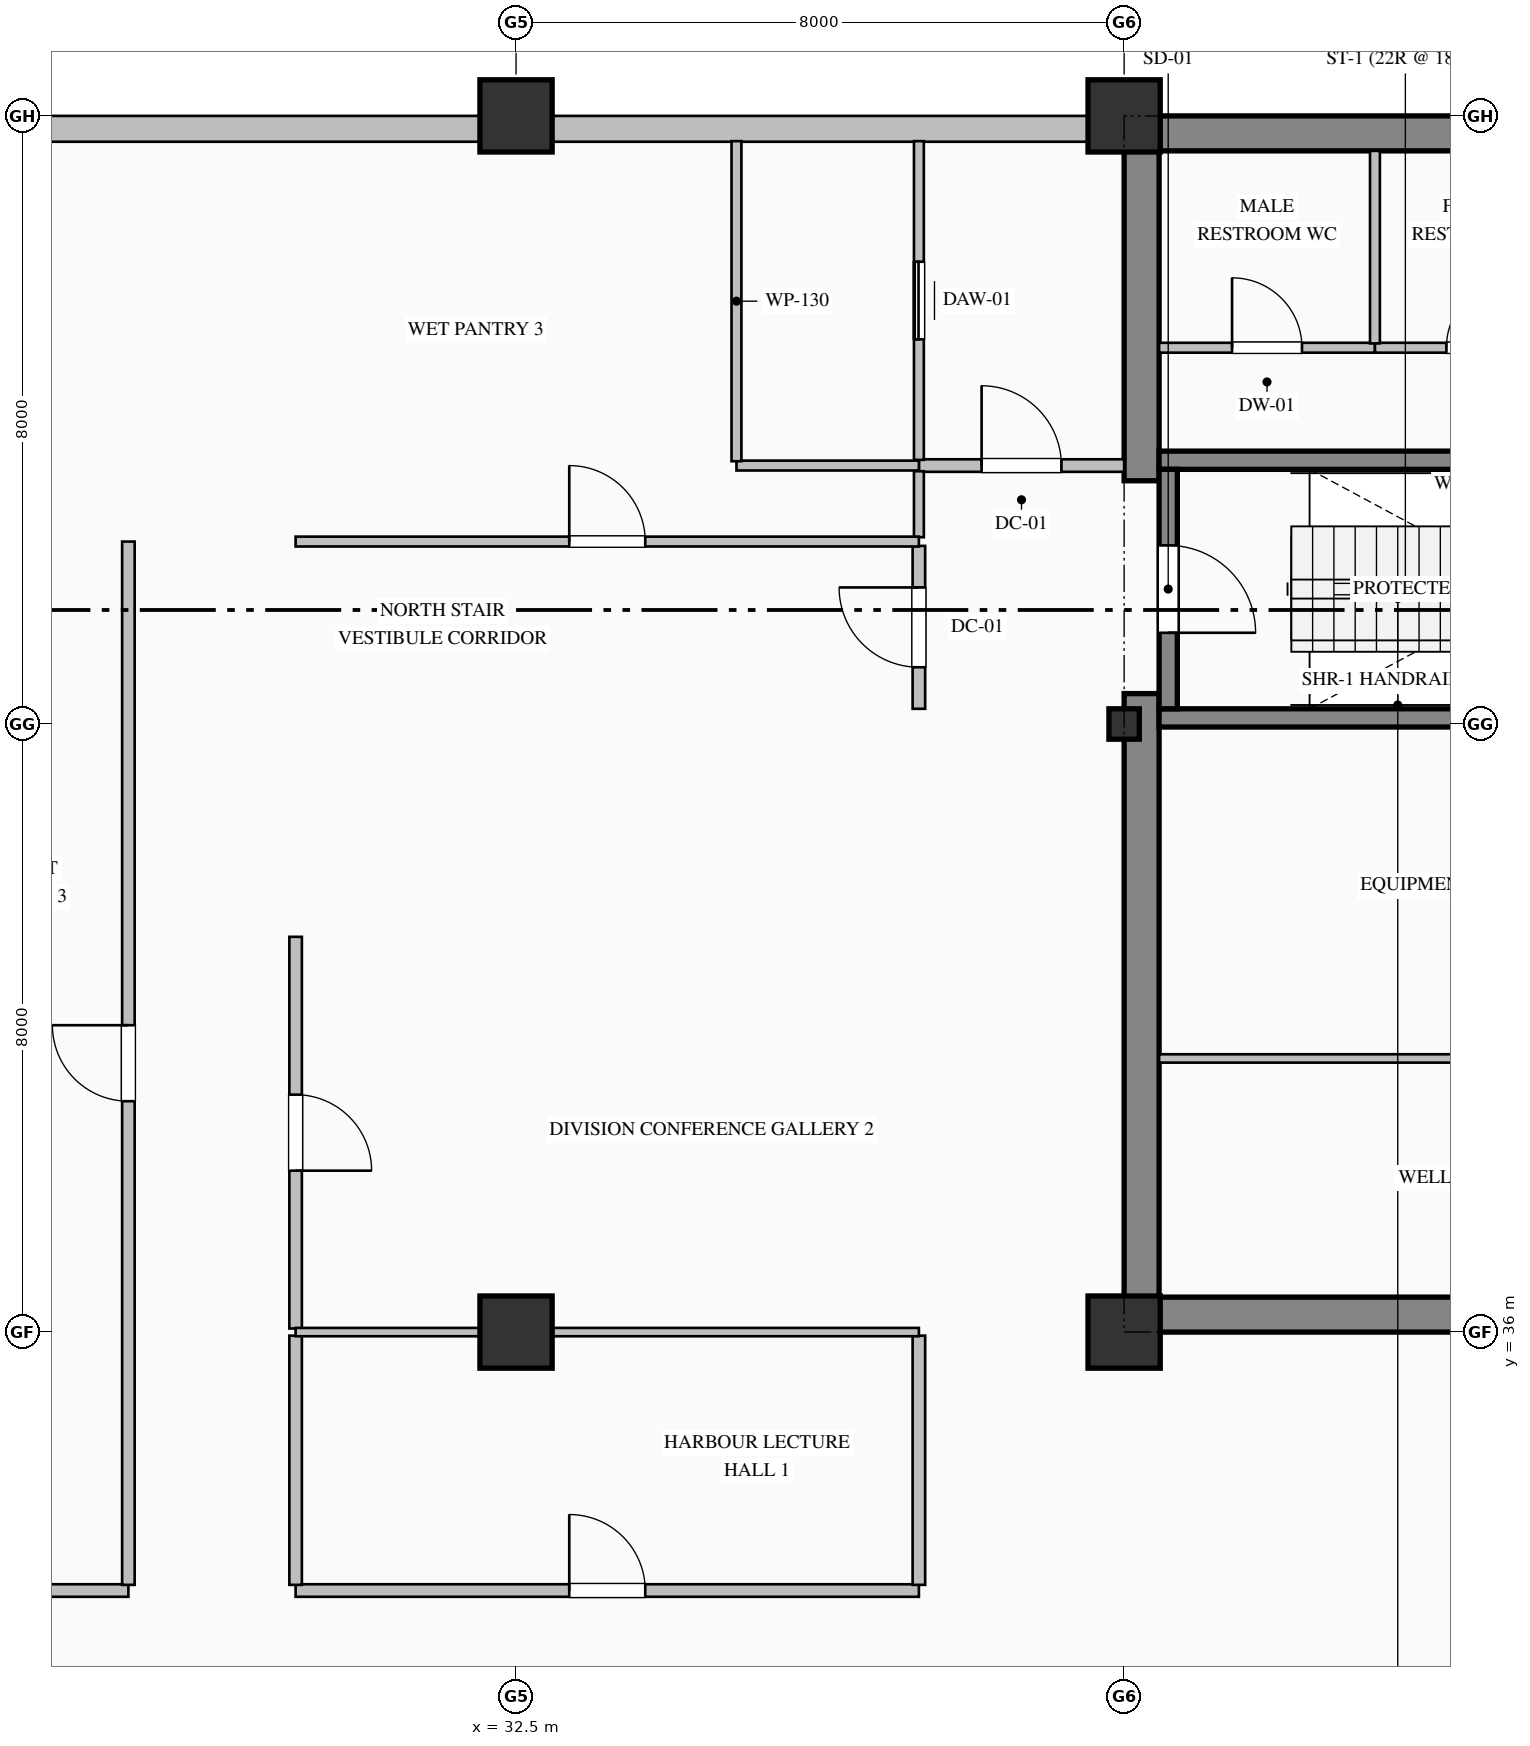
"""IFC4 building model, lengths in metres.
Left out: names, types, materials, properties, quantities, classifications, styles, units other than length and angle.
Written with IfcOpenShell. Run it as: python <this file> out.ifc"""

import sys

from ifc_helpers import new_model, si_unit, direction, frame, frame_2d, origin, origin_2d, place, context, subcontext, project, spatial, rectangle, hollow_rectangle, i_section, extrude, element, fill, save


model = new_model("IFC4")
c1 = context("Model", 3, precision=1e-05, world=origin(), true_north=direction((0.0, 1.0)))
c2 = subcontext(c1, "Body", "Model", "MODEL_VIEW")
j1 = project(units=[si_unit("LENGTHUNIT", "METRE"), si_unit("PLANEANGLEUNIT", "RADIAN")], contexts=[c1])
p1 = place(None, origin())
s1 = spatial("IfcSite", under=j1, at=p1, CompositionType="ELEMENT")
p2 = place(p1, origin())
s2 = spatial("IfcBuilding", under=s1, at=p2, CompositionType="ELEMENT")
p3 = place(p2, frame((0.0, 0.0, 221.8)))
s3 = spatial("IfcBuildingStorey", under=s2, at=p3, CompositionType="ELEMENT", Elevation=221.8)
p4 = place(p3, frame((40.5, 51.77, 0.0), z_axis=(0.0, 0.0, 1.0), x_axis=(1.0, 0.0, 0.0)))
e1 = element("IfcWall", 1, at=p4, inside=s3, PredefinedType="SHEAR", context=c2, shape_type="SweptSolid", body=[
    extrude(rectangle(XDim=23.5, YDim=0.46, at=frame_2d((11.75, 0.0))), origin(), (0.0, 0.0, 1.0), 3.775),
])
p5 = place(p3, frame((40.73, 36.46, 0.0), z_axis=(0.0, 0.0, 1.0), x_axis=(0.0, 1.0, 0.0)))
e2 = element("IfcWall", 2, at=p5, inside=s3, PredefinedType="SHEAR", context=c2, shape_type="SweptSolid", body=[
    extrude(rectangle(XDim=7.94, YDim=0.46, at=frame_2d((3.97, 0.0))), origin(), (0.0, 0.0, 1.0), 3.775),
])
p6 = place(p3, frame((40.73, 47.2, 0.0), z_axis=(0.0, 0.0, 1.0), x_axis=(0.0, 1.0, 0.0)))
e3 = element("IfcWall", 3, at=p6, inside=s3, PredefinedType="SHEAR", context=c2, shape_type="SweptSolid", body=[
    extrude(rectangle(XDim=4.34, YDim=0.46, at=frame_2d((2.17, 0.0))), origin(), (0.0, 0.0, 1.0), 3.775),
])
p7 = place(p3, frame((40.5, 36.23, 0.0), z_axis=(0.0, 0.0, 1.0), x_axis=(1.0, 0.0, 0.0)))
e4 = element("IfcWall", 4, at=p7, inside=s3, PredefinedType="SHEAR", context=c2, shape_type="SweptSolid", body=[
    extrude(rectangle(XDim=9.1, YDim=0.46, at=frame_2d((4.55, 0.0))), origin(), (0.0, 0.0, 1.0), 3.775),
])
for number, where, z_axis, x_axis in (
    (5, (32.5, 36.0, 0.0), (0.0, 0.0, 1.0), (1.0, 0.0, 0.0)),
    (6, (32.5, 52.0, 0.0), (0.0, 0.0, 1.0), (1.0, 0.0, 0.0)),
    (7, (40.5, 36.0, 0.0), (0.0, 0.0, 1.0), (1.0, 0.0, 0.0)),
):
    element("IfcColumn", number, at=place(p3, frame(where, z_axis=z_axis, x_axis=x_axis)), inside=s3, PredefinedType="COLUMN", context=c2, shape_type="SweptSolid", body=[
        extrude(hollow_rectangle(XDim=0.95, YDim=0.95, WallThickness=0.036, at=origin_2d()), origin(), (0.0, 0.0, 1.0), 4.0),
    ])
p8 = place(p3, frame((40.5, 44.0, 0.0), z_axis=(0.0, 0.0, 1.0), x_axis=(1.0, 0.0, 0.0)))
e8 = element("IfcColumn", 8, at=p8, inside=s3, PredefinedType="COLUMN", context=c2, shape_type="SweptSolid", body=[
    extrude(i_section(OverallWidth=0.4, OverallDepth=0.4, WebThickness=0.013, FlangeThickness=0.021, FilletRadius=0.022, at=origin_2d()), origin(), (0.0, 0.0, 1.0), 4.0),
])
p9 = place(p3, frame((40.5, 52.0, 0.0), z_axis=(0.0, 0.0, 1.0), x_axis=(1.0, 0.0, 0.0)))
e9 = element("IfcColumn", 9, at=p9, inside=s3, PredefinedType="COLUMN", context=c2, shape_type="SweptSolid", body=[
    extrude(hollow_rectangle(XDim=0.95, YDim=0.95, WallThickness=0.036, at=origin_2d()), origin(), (0.0, 0.0, 1.0), 4.0),
])
p10 = place(p3, frame((13.0, 51.83, 0.0), z_axis=(0.0, 0.0, 1.0), x_axis=(1.0, 0.0, 0.0)))
e10 = element("IfcWall", 10, at=p10, inside=s3, PredefinedType="SOLIDWALL", context=c2, shape_type="SweptSolid", body=[
    extrude(rectangle(XDim=27.52, YDim=0.34, at=frame_2d((13.76, 0.0))), origin(), (0.0, 0.0, 1.0), 3.325),
])
p11 = place(p10, frame((6.45, 0.0, 0.7)))
e11 = element("IfcOpeningElement", 11, at=p11, cuts=e10, PredefinedType="OPENING", context=c2, shape_type="SweptSolid", body=[
    extrude(rectangle(XDim=1.5, YDim=2.4, at=frame_2d((0.75, 1.2))), frame((0.0, 0.18, 0.0), z_axis=(0.0, -1.0, 0.0), x_axis=(1.0, 0.0, 0.0)), (0.0, 0.0, 1.0), 0.36),
])
for number, where, z_axis, x_axis in (
    (12, (40.96, 47.47, 0.0), (0.0, 0.0, 1.0), (1.0, 0.0, 0.0)),
    (13, (49.04, 44.08, 0.0), (0.0, 0.0, 1.0), (-1.0, 0.0, 0.0)),
):
    element("IfcWall", number, at=place(p3, frame(where, z_axis=z_axis, x_axis=x_axis)), inside=s3, PredefinedType="SOLIDWALL", context=c2, shape_type="SweptSolid", body=[
        extrude(rectangle(XDim=8.08, YDim=0.24, at=frame_2d((4.04, 0.0))), origin(), (0.0, 0.0, 1.0), 4.0),
    ])
p12 = place(p3, frame((41.08, 47.35, 0.0), z_axis=(0.0, 0.0, 1.0), x_axis=(0.0, -1.0, 0.0)))
e14 = element("IfcWall", 14, at=p12, inside=s3, PredefinedType="SOLIDWALL", context=c2, shape_type="SweptSolid", body=[
    extrude(rectangle(XDim=3.15, YDim=0.24, at=frame_2d((1.575, 0.0))), origin(), (0.0, 0.0, 1.0), 4.0),
])
p13 = place(p12, frame((1.0, 0.0, 0.0)))
e15 = element("IfcOpeningElement", 15, at=p13, cuts=e14, PredefinedType="OPENING", context=c2, shape_type="SweptSolid", body=[
    extrude(rectangle(XDim=1.15, YDim=2.2, at=frame_2d((0.575, 1.1))), frame((0.0, 0.13, 0.0), z_axis=(0.0, -1.0, 0.0), x_axis=(1.0, 0.0, 0.0)), (0.0, 0.0, 1.0), 0.26),
])
p14 = place(p3, frame((37.8, 47.4, 0.0), z_axis=(0.0, 0.0, 1.0), x_axis=(1.0, 0.0, 0.0)))
e16 = element("IfcWall", 16, at=p14, inside=s3, PredefinedType="PARTITIONING", context=c2, shape_type="SweptSolid", body=[
    extrude(rectangle(XDim=2.7, YDim=0.165, at=frame_2d((1.35, 0.0))), origin(), (0.0, 0.0, 1.0), 3.775),
])
p15 = place(p14, frame((0.825, 0.0, 0.0)))
e17 = element("IfcOpeningElement", 17, at=p15, cuts=e16, PredefinedType="OPENING", context=c2, shape_type="SweptSolid", body=[
    extrude(rectangle(XDim=1.05, YDim=2.15, at=frame_2d((0.525, 1.075))), frame((0.0, 0.093, 0.0), z_axis=(0.0, -1.0, 0.0), x_axis=(1.0, 0.0, 0.0)), (0.0, 0.0, 1.0), 0.185),
])
p16 = place(p3, frame((37.8, 44.2, 0.0), z_axis=(0.0, 0.0, 1.0), x_axis=(0.0, 1.0, 0.0)))
e18 = element("IfcWall", 18, at=p16, inside=s3, PredefinedType="PARTITIONING", context=c2, shape_type="SweptSolid", body=[
    extrude(rectangle(XDim=2.143, YDim=0.165, at=frame_2d((1.072, 0.0))), origin(), (0.0, 0.0, 1.0), 3.775),
])
p17 = place(p16, frame((0.546, 0.0, 0.0)))
e19 = element("IfcOpeningElement", 19, at=p17, cuts=e18, PredefinedType="OPENING", context=c2, shape_type="SweptSolid", body=[
    extrude(rectangle(XDim=1.05, YDim=2.15, at=frame_2d((0.525, 1.075))), frame((0.0, 0.093, 0.0), z_axis=(0.0, -1.0, 0.0), x_axis=(1.0, 0.0, 0.0)), (0.0, 0.0, 1.0), 0.185),
])
p18 = place(p3, frame((37.8, 46.457, 0.0), z_axis=(0.0, 0.0, 1.0), x_axis=(0.0, 1.0, 0.0)))
e20 = element("IfcWall", 20, at=p18, inside=s3, PredefinedType="PARTITIONING", context=c2, shape_type="SweptSolid", body=[
    extrude(rectangle(XDim=0.868, YDim=0.13, at=frame_2d((0.434, 0.0))), origin(), (0.0, 0.0, 1.0), 3.775),
])
p19 = place(p3, frame((37.8, 47.475, 0.0), z_axis=(0.0, 0.0, 1.0), x_axis=(0.0, 1.0, 0.0)))
e21 = element("IfcWall", 21, at=p19, inside=s3, PredefinedType="PARTITIONING", context=c2, shape_type="SweptSolid", body=[
    extrude(rectangle(XDim=4.193, YDim=0.13, at=frame_2d((2.097, 0.0))), origin(), (0.0, 0.0, 1.0), 3.775),
])
p20 = place(p19, frame((1.587, 0.0, 0.0)))
e22 = element("IfcOpeningElement", 22, at=p20, cuts=e21, PredefinedType="OPENING", context=c2, shape_type="SweptSolid", body=[
    extrude(rectangle(XDim=1.02, YDim=2.15, at=frame_2d((0.51, 1.075))), frame((0.0, 0.075, 0.0), z_axis=(0.0, -1.0, 0.0), x_axis=(1.0, 0.0, 0.0)), (0.0, 0.0, 1.0), 0.15),
])
p21 = place(p3, frame((37.8, 47.4, 0.0), z_axis=(0.0, 0.0, 1.0), x_axis=(-1.0, 0.0, 0.0)))
e23 = element("IfcWall", 23, at=p21, inside=s3, PredefinedType="PARTITIONING", context=c2, shape_type="SweptSolid", body=[
    extrude(rectangle(XDim=2.4, YDim=0.13, at=frame_2d((1.2, 0.0))), origin(), (0.0, 0.0, 1.0), 3.775),
])
p22 = place(p3, frame((35.4, 47.457, 0.0), z_axis=(0.0, 0.0, 1.0), x_axis=(0.0, 1.0, 0.0)))
e24 = element("IfcWall", 24, at=p22, inside=s3, PredefinedType="PARTITIONING", context=c2, shape_type="SweptSolid", body=[
    extrude(rectangle(XDim=4.211, YDim=0.13, at=frame_2d((2.105, 0.0))), origin(), (0.0, 0.0, 1.0), 3.775),
])
p23 = place(p3, frame((40.96, 48.95, 0.0), z_axis=(0.0, 0.0, 1.0), x_axis=(1.0, 0.0, 0.0)))
e25 = element("IfcWall", 25, at=p23, inside=s3, PredefinedType="PARTITIONING", context=c2, shape_type="SweptSolid", body=[
    extrude(rectangle(XDim=2.84, YDim=0.13, at=frame_2d((1.42, 0.0))), origin(), (0.0, 0.0, 1.0), 3.775),
])
p24 = place(p23, frame((0.96, 0.0, 0.0)))
e26 = element("IfcOpeningElement", 26, at=p24, cuts=e25, PredefinedType="OPENING", context=c2, shape_type="SweptSolid", body=[
    extrude(rectangle(XDim=0.92, YDim=2.15, at=frame_2d((0.46, 1.075))), frame((0.0, 0.075, 0.0), z_axis=(0.0, -1.0, 0.0), x_axis=(1.0, 0.0, 0.0)), (0.0, 0.0, 1.0), 0.15),
])
p25 = place(p3, frame((43.8, 48.95, 0.0), z_axis=(0.0, 0.0, 1.0), x_axis=(1.0, 0.0, 0.0)))
e27 = element("IfcWall", 27, at=p25, inside=s3, PredefinedType="PARTITIONING", context=c2, shape_type="SweptSolid", body=[
    extrude(rectangle(XDim=2.8, YDim=0.13, at=frame_2d((1.4, 0.0))), origin(), (0.0, 0.0, 1.0), 3.775),
])
p26 = place(p25, frame((0.94, 0.0, 0.0)))
e28 = element("IfcOpeningElement", 28, at=p26, cuts=e27, PredefinedType="OPENING", context=c2, shape_type="SweptSolid", body=[
    extrude(rectangle(XDim=0.92, YDim=2.15, at=frame_2d((0.46, 1.075))), frame((0.0, 0.075, 0.0), z_axis=(0.0, -1.0, 0.0), x_axis=(1.0, 0.0, 0.0)), (0.0, 0.0, 1.0), 0.15),
])
p27 = place(p3, frame((40.96, 39.6, 0.0), z_axis=(0.0, 0.0, 1.0), x_axis=(1.0, 0.0, 0.0)))
e29 = element("IfcWall", 29, at=p27, inside=s3, PredefinedType="MOVABLE", context=c2, shape_type="SweptSolid", body=[
    extrude(rectangle(XDim=8.44, YDim=0.11, at=frame_2d((4.22, 0.0))), origin(), (0.0, 0.0, 1.0), 3.775),
])
p28 = place(p3, frame((43.8, 51.54, 0.0), z_axis=(0.0, 0.0, 1.0), x_axis=(0.0, -1.0, 0.0)))
e30 = element("IfcWall", 30, at=p28, inside=s3, PredefinedType="PARTITIONING", context=c2, shape_type="SweptSolid", body=[
    extrude(rectangle(XDim=2.533, YDim=0.13, at=frame_2d((1.267, 0.0))), origin(), (0.0, 0.0, 1.0), 3.775),
])
p29 = place(p3, frame((24.5, 32.6, 0.0), z_axis=(0.0, 0.0, 1.0), x_axis=(1.0, 0.0, 0.0)))
e31 = element("IfcWall", 31, at=p29, inside=s3, PredefinedType="PARTITIONING", context=c2, shape_type="SweptSolid", body=[
    extrude(rectangle(XDim=2.9, YDim=0.165, at=frame_2d((1.45, 0.0))), origin(), (0.0, 0.0, 1.0), 3.775),
])
p30 = place(p3, frame((29.6, 32.6, 0.0), z_axis=(0.0, 0.0, 1.0), x_axis=(1.0, 0.0, 0.0)))
e32 = element("IfcWall", 32, at=p30, inside=s3, PredefinedType="PARTITIONING", context=c2, shape_type="SweptSolid", body=[
    extrude(rectangle(XDim=8.2, YDim=0.165, at=frame_2d((4.1, 0.0))), origin(), (0.0, 0.0, 1.0), 3.775),
])
p31 = place(p30, frame((3.6, 0.0, 0.0)))
e33 = element("IfcOpeningElement", 33, at=p31, cuts=e32, PredefinedType="OPENING", context=c2, shape_type="SweptSolid", body=[
    extrude(rectangle(XDim=1.0, YDim=2.15, at=frame_2d((0.5, 1.075))), frame((0.0, 0.093, 0.0), z_axis=(0.0, -1.0, 0.0), x_axis=(1.0, 0.0, 0.0)), (0.0, 0.0, 1.0), 0.185),
])
p32 = place(p3, frame((27.4, 32.675, 0.0), z_axis=(0.0, 0.0, 1.0), x_axis=(0.0, 1.0, 0.0)))
e34 = element("IfcWall", 34, at=p32, inside=s3, PredefinedType="PARTITIONING", context=c2, shape_type="SweptSolid", body=[
    extrude(rectangle(XDim=13.725, YDim=0.165, at=frame_2d((6.863, 0.0))), origin(), (0.0, 0.0, 1.0), 3.775),
])
p33 = place(p32, frame((6.363, 0.0, 0.0)))
e35 = element("IfcOpeningElement", 35, at=p33, cuts=e34, PredefinedType="OPENING", context=c2, shape_type="SweptSolid", body=[
    extrude(rectangle(XDim=1.0, YDim=2.15, at=frame_2d((0.5, 1.075))), frame((0.0, 0.093, 0.0), z_axis=(0.0, -1.0, 0.0), x_axis=(1.0, 0.0, 0.0)), (0.0, 0.0, 1.0), 0.185),
])
p34 = place(p3, frame((29.6, 35.953, 0.0), z_axis=(0.0, 0.0, 1.0), x_axis=(0.0, -1.0, 0.0)))
e36 = element("IfcWall", 36, at=p34, inside=s3, PredefinedType="PARTITIONING", context=c2, shape_type="SweptSolid", body=[
    extrude(rectangle(XDim=3.278, YDim=0.165, at=frame_2d((1.639, 0.0))), origin(), (0.0, 0.0, 1.0), 3.775),
])
p35 = place(p3, frame((29.6, 41.2, 0.0), z_axis=(0.0, 0.0, 1.0), x_axis=(0.0, -1.0, 0.0)))
e37 = element("IfcWall", 37, at=p35, inside=s3, PredefinedType="PARTITIONING", context=c2, shape_type="SweptSolid", body=[
    extrude(rectangle(XDim=5.153, YDim=0.165, at=frame_2d((2.576, 0.0))), origin(), (0.0, 0.0, 1.0), 3.775),
])
p36 = place(p35, frame((2.076, 0.0, 0.0)))
e38 = element("IfcOpeningElement", 38, at=p36, cuts=e37, PredefinedType="OPENING", context=c2, shape_type="SweptSolid", body=[
    extrude(rectangle(XDim=1.0, YDim=2.15, at=frame_2d((0.5, 1.075))), frame((0.0, 0.093, 0.0), z_axis=(0.0, -1.0, 0.0), x_axis=(1.0, 0.0, 0.0)), (0.0, 0.0, 1.0), 0.185),
])
p37 = place(p3, frame((29.6, 46.4, 0.0), z_axis=(0.0, 0.0, 1.0), x_axis=(1.0, 0.0, 0.0)))
e39 = element("IfcWall", 39, at=p37, inside=s3, PredefinedType="PARTITIONING", context=c2, shape_type="SweptSolid", body=[
    extrude(rectangle(XDim=8.2, YDim=0.13, at=frame_2d((4.1, 0.0))), origin(), (0.0, 0.0, 1.0), 3.775),
])
p38 = place(p37, frame((3.6, 0.0, 0.0)))
e40 = element("IfcOpeningElement", 40, at=p38, cuts=e39, PredefinedType="OPENING", context=c2, shape_type="SweptSolid", body=[
    extrude(rectangle(XDim=1.0, YDim=2.15, at=frame_2d((0.5, 1.075))), frame((0.0, 0.075, 0.0), z_axis=(0.0, -1.0, 0.0), x_axis=(1.0, 0.0, 0.0)), (0.0, 0.0, 1.0), 0.15),
])
p39 = place(p3, frame((37.8, 32.675, 0.0), z_axis=(0.0, 0.0, 1.0), x_axis=(0.0, 1.0, 0.0)))
e41 = element("IfcWall", 41, at=p39, inside=s3, PredefinedType="PARTITIONING", context=c2, shape_type="SweptSolid", body=[
    extrude(rectangle(XDim=3.278, YDim=0.165, at=frame_2d((1.639, 0.0))), origin(), (0.0, 0.0, 1.0), 3.775),
])
p40 = place(p3, frame((29.6, 36.0, 0.0), z_axis=(0.0, 0.0, 1.0), x_axis=(1.0, 0.0, 0.0)))
e42 = element("IfcWall", 42, at=p40, inside=s3, PredefinedType="MOVABLE", context=c2, shape_type="SweptSolid", body=[
    extrude(rectangle(XDim=8.2, YDim=0.11, at=frame_2d((4.1, 0.0))), origin(), (0.0, 0.0, 1.0), 3.179),
])
p41 = place(p13, origin())
e43 = element("IfcDoor", 43, at=p41, inside=s3, OperationType="SINGLE_SWING_RIGHT", PredefinedType="DOOR", context=c2, shape_type="SweptSolid", body=[
    extrude(rectangle(XDim=1.15, YDim=2.2, at=frame_2d((0.575, 1.1))), frame((0.0, 0.025, 0.0), z_axis=(0.0, -1.0, 0.0), x_axis=(1.0, 0.0, 0.0)), (0.0, 0.0, 1.0), 0.05),
])
fill(e15, e43)
p42 = place(p15, origin())
e44 = element("IfcDoor", 44, at=p42, inside=s3, OperationType="SINGLE_SWING_LEFT", PredefinedType="DOOR", context=c2, shape_type="SweptSolid", body=[
    extrude(rectangle(XDim=1.05, YDim=2.15, at=frame_2d((0.525, 1.075))), frame((0.0, 0.025, 0.0), z_axis=(0.0, -1.0, 0.0), x_axis=(1.0, 0.0, 0.0)), (0.0, 0.0, 1.0), 0.05),
])
fill(e17, e44)
p43 = place(p17, origin())
e45 = element("IfcDoor", 45, at=p43, inside=s3, OperationType="SINGLE_SWING_RIGHT", PredefinedType="DOOR", context=c2, shape_type="SweptSolid", body=[
    extrude(rectangle(XDim=1.05, YDim=2.15, at=frame_2d((0.525, 1.075))), frame((0.0, 0.025, 0.0), z_axis=(0.0, -1.0, 0.0), x_axis=(1.0, 0.0, 0.0)), (0.0, 0.0, 1.0), 0.05),
])
fill(e19, e45)
p44 = place(p20, origin())
e46 = element("IfcDoor", 46, at=p44, inside=s3, OperationType="SLIDING_TO_LEFT", PredefinedType="DOOR", context=c2, shape_type="SweptSolid", body=[
    extrude(rectangle(XDim=1.02, YDim=2.15, at=frame_2d((0.51, 1.075))), frame((0.0, 0.025, 0.0), z_axis=(0.0, -1.0, 0.0), x_axis=(1.0, 0.0, 0.0)), (0.0, 0.0, 1.0), 0.05),
])
fill(e22, e46)
p45 = place(p24, origin())
e47 = element("IfcDoor", 47, at=p45, inside=s3, OperationType="SINGLE_SWING_LEFT", PredefinedType="DOOR", context=c2, shape_type="SweptSolid", body=[
    extrude(rectangle(XDim=0.92, YDim=2.15, at=frame_2d((0.46, 1.075))), frame((0.0, 0.025, 0.0), z_axis=(0.0, -1.0, 0.0), x_axis=(1.0, 0.0, 0.0)), (0.0, 0.0, 1.0), 0.05),
])
fill(e26, e47)
p46 = place(p26, origin())
e48 = element("IfcDoor", 48, at=p46, inside=s3, OperationType="SINGLE_SWING_RIGHT", PredefinedType="DOOR", context=c2, shape_type="SweptSolid", body=[
    extrude(rectangle(XDim=0.92, YDim=2.15, at=frame_2d((0.46, 1.075))), frame((0.0, 0.025, 0.0), z_axis=(0.0, -1.0, 0.0), x_axis=(1.0, 0.0, 0.0)), (0.0, 0.0, 1.0), 0.05),
])
fill(e28, e48)
p47 = place(p33, origin())
e49 = element("IfcDoor", 49, at=p47, inside=s3, OperationType="SINGLE_SWING_RIGHT", PredefinedType="DOOR", context=c2, shape_type="SweptSolid", body=[
    extrude(rectangle(XDim=1.0, YDim=2.15, at=frame_2d((0.5, 1.075))), frame((0.0, 0.025, 0.0), z_axis=(0.0, -1.0, 0.0), x_axis=(1.0, 0.0, 0.0)), (0.0, 0.0, 1.0), 0.05),
])
fill(e35, e49)
p48 = place(p31, origin())
e50 = element("IfcDoor", 50, at=p48, inside=s3, OperationType="SINGLE_SWING_LEFT", PredefinedType="DOOR", context=c2, shape_type="SweptSolid", body=[
    extrude(rectangle(XDim=1.0, YDim=2.15, at=frame_2d((0.5, 1.075))), frame((0.0, 0.025, 0.0), z_axis=(0.0, -1.0, 0.0), x_axis=(1.0, 0.0, 0.0)), (0.0, 0.0, 1.0), 0.05),
])
fill(e33, e50)
p49 = place(p36, origin())
e51 = element("IfcDoor", 51, at=p49, inside=s3, OperationType="SINGLE_SWING_RIGHT", PredefinedType="DOOR", context=c2, shape_type="SweptSolid", body=[
    extrude(rectangle(XDim=1.0, YDim=2.15, at=frame_2d((0.5, 1.075))), frame((0.0, 0.025, 0.0), z_axis=(0.0, -1.0, 0.0), x_axis=(1.0, 0.0, 0.0)), (0.0, 0.0, 1.0), 0.05),
])
fill(e38, e51)
p50 = place(p38, origin())
e52 = element("IfcDoor", 52, at=p50, inside=s3, OperationType="SINGLE_SWING_LEFT", PredefinedType="DOOR", context=c2, shape_type="SweptSolid", body=[
    extrude(rectangle(XDim=1.0, YDim=2.15, at=frame_2d((0.5, 1.075))), frame((0.0, 0.025, 0.0), z_axis=(0.0, -1.0, 0.0), x_axis=(1.0, 0.0, 0.0)), (0.0, 0.0, 1.0), 0.05),
])
fill(e40, e52)
save(model, sys.argv[1])
